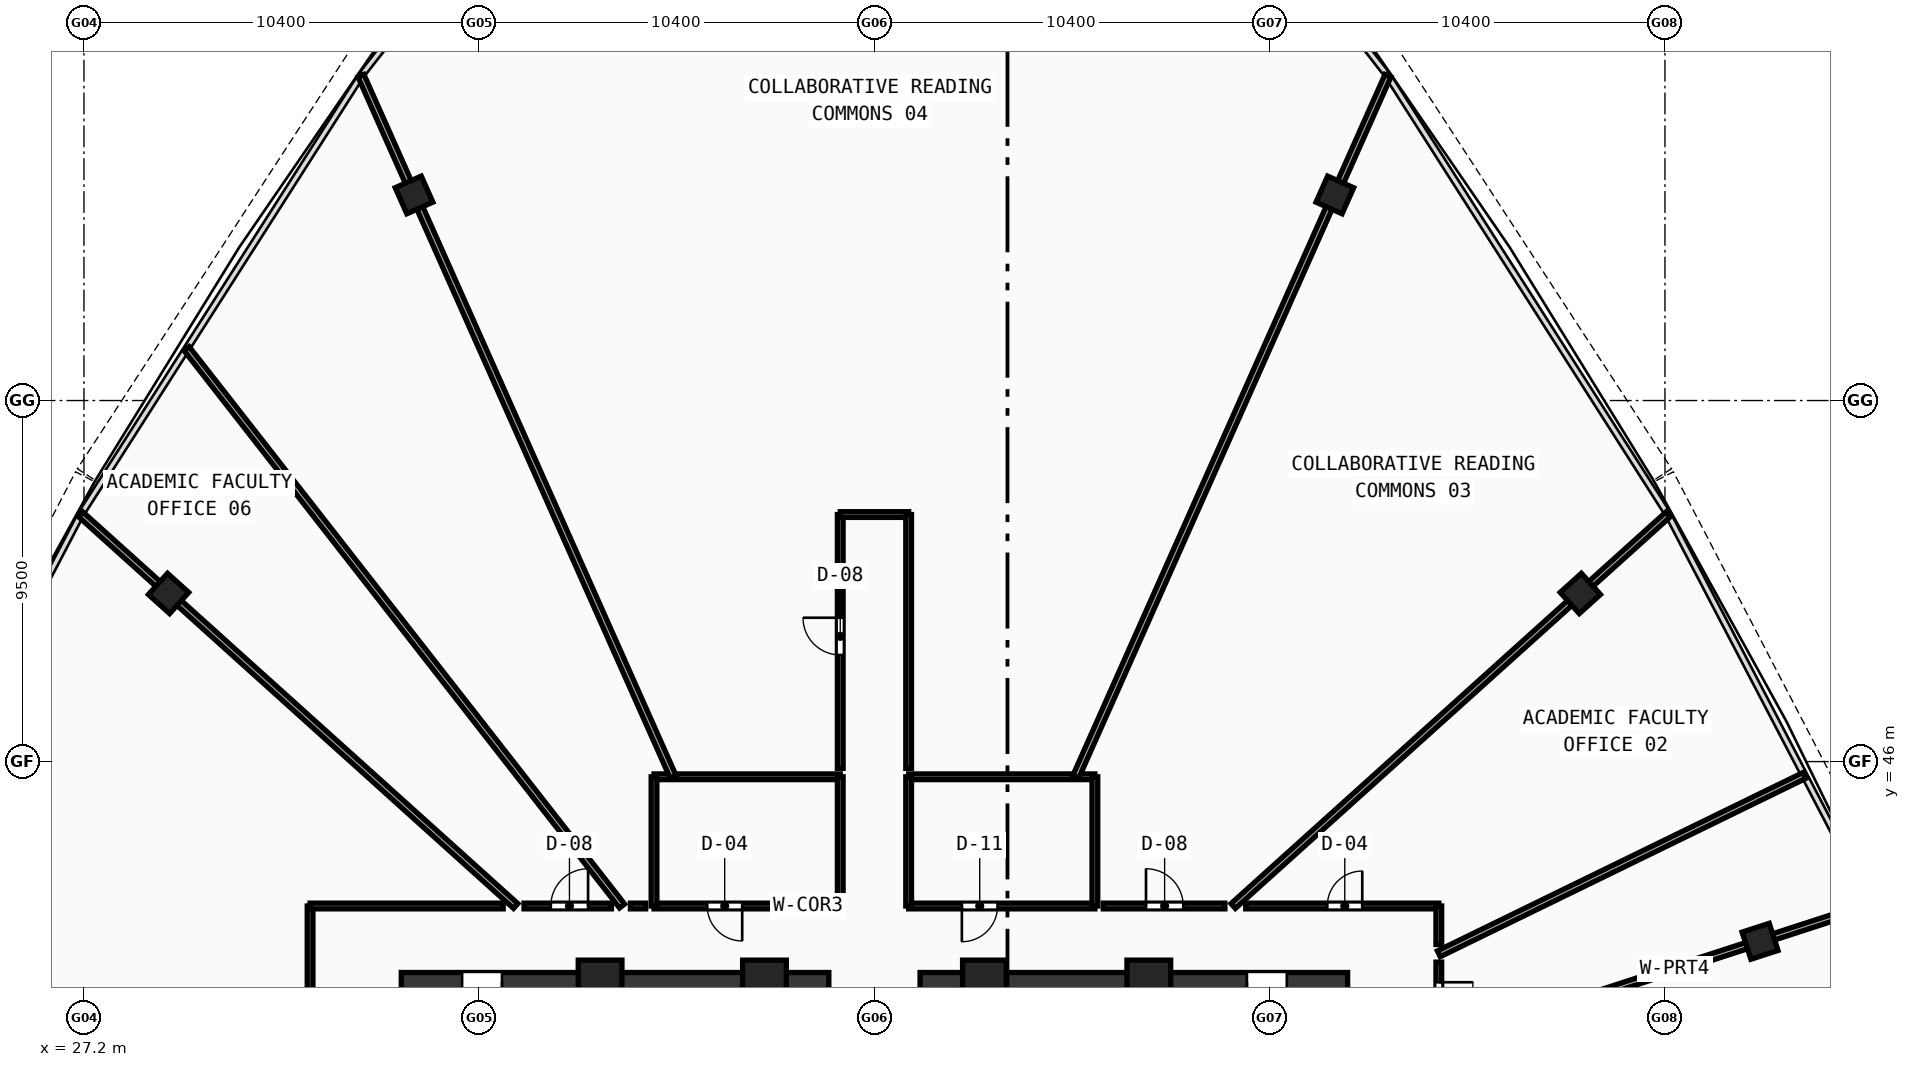
"""IFC4 building model, lengths in metres.
Left out: names, types, materials, properties, quantities, classifications, styles, units other than length and angle.
Written with IfcOpenShell. Run it as: python <this file> out.ifc"""

import sys

from ifc_helpers import new_model, si_unit, direction, frame, frame_2d, origin, origin_with_axes, origin_2d, place, context, subcontext, project, spatial, rectangle, hollow_rectangle, extrude, source, transform, mapped, element, fill, save


model = new_model("IFC4")
c1 = context("Model", 3, precision=1e-05, world=origin(), true_north=direction((0.0, 1.0)))
c2 = subcontext(c1, "Body", "Model", "MODEL_VIEW")
j1 = project(units=[si_unit("LENGTHUNIT", "METRE"), si_unit("PLANEANGLEUNIT", "RADIAN")], contexts=[c1])
p1 = place(None, origin())
s1 = spatial("IfcSite", under=j1, at=p1, CompositionType="ELEMENT")
p2 = place(p1, origin())
s2 = spatial("IfcBuilding", under=s1, at=p2, CompositionType="ELEMENT")
p3 = place(p2, frame((0.0, 0.0, 285.02)))
s3 = spatial("IfcBuildingStorey", under=s2, at=p3, CompositionType="ELEMENT", Elevation=285.02)
p4 = place(p3, frame((35.55, 40.2, 0.0), z_axis=(0.0, 0.0, 1.0), x_axis=(1.0, 0.0, 0.0)))
e1 = element("IfcWall", 1, at=p4, inside=s3, PredefinedType="SHEAR", context=c2, shape_type="SweptSolid", body=[
    extrude(rectangle(XDim=11.25, YDim=0.5, at=frame_2d((5.625, 0.0))), origin(), (0.0, 0.0, 1.0), 3.47),
])
p5 = place(p4, frame((1.6, 0.0, 0.0)))
e2 = element("IfcOpeningElement", 2, at=p5, cuts=e1, PredefinedType="OPENING", context=c2, shape_type="SweptSolid", body=[
    extrude(rectangle(XDim=1.05, YDim=2.1, at=frame_2d((0.525, 1.05))), frame((0.0, 0.26, 0.0), z_axis=(0.0, -1.0, 0.0), x_axis=(1.0, 0.0, 0.0)), (0.0, 0.0, 1.0), 0.52),
])
p6 = place(p3, frame((49.2, 40.2, 0.0), z_axis=(0.0, 0.0, 1.0), x_axis=(1.0, 0.0, 0.0)))
e3 = element("IfcWall", 3, at=p6, inside=s3, PredefinedType="SHEAR", context=c2, shape_type="SweptSolid", body=[
    extrude(rectangle(XDim=11.25, YDim=0.5, at=frame_2d((5.625, 0.0))), origin(), (0.0, 0.0, 1.0), 3.47),
])
p7 = place(p6, frame((8.6, 0.0, 0.0)))
e4 = element("IfcOpeningElement", 4, at=p7, cuts=e3, PredefinedType="OPENING", context=c2, shape_type="SweptSolid", body=[
    extrude(rectangle(XDim=1.05, YDim=2.1, at=frame_2d((0.525, 1.05))), frame((0.0, 0.26, 0.0), z_axis=(0.0, -1.0, 0.0), x_axis=(1.0, 0.0, 0.0)), (0.0, 0.0, 1.0), 0.52),
])
m1 = source(origin(), c2, "Body", "SweptSolid", [
    extrude(hollow_rectangle(XDim=1.15, YDim=1.15, WallThickness=0.048, at=origin_2d()), origin(), (0.0, 0.0, 1.0), 3.73),
])
for number, where, z_axis, x_axis in (
    (5, (55.219, 40.2, -0.26), (0.0, 0.0, 1.0), (1.0, 0.0, 0.0)),
    (6, (50.894, 40.2, -0.26), (0.0, 0.0, 1.0), (1.0, 0.0, 0.0)),
    (7, (45.106, 40.2, -0.26), (0.0, 0.0, 1.0), (1.0, 0.0, 0.0)),
    (8, (40.781, 40.2, -0.26), (0.0, 0.0, 1.0), (1.0, 0.0, 0.0)),
):
    element("IfcColumn", number, at=place(p3, frame(where, z_axis=z_axis, x_axis=x_axis)), inside=s3, PredefinedType="COLUMN", context=c2, shape_type="MappedRepresentation", body=[
        mapped(m1, transform((0.0, 0.0, 0.0), scale=1.0)),
    ])
m2 = source(origin(), c2, "Body", "SweptSolid", [
    extrude(hollow_rectangle(XDim=0.75, YDim=0.75, WallThickness=0.028, at=origin_2d()), origin(), (0.0, 0.0, 1.0), 3.73),
])
for number, where, z_axis, x_axis in (
    (9, (71.302, 41.271, -0.26), (0.0, 0.0, 1.0), (-0.309, 0.951, 0.0)),
    (10, (66.573, 50.424, -0.26), (0.0, 0.0, 1.0), (-0.669, 0.743, 0.0)),
    (11, (60.114, 60.909, -0.26), (0.0, 0.0, 1.0), (-0.914, 0.407, 0.0)),
    (12, (35.886, 60.909, -0.26), (0.0, 0.0, 1.0), (-0.914, -0.407, 0.0)),
    (13, (29.427, 50.424, -0.26), (0.0, 0.0, 1.0), (-0.669, -0.743, 0.0)),
):
    element("IfcColumn", number, at=place(p3, frame(where, z_axis=z_axis, x_axis=x_axis)), inside=s3, PredefinedType="COLUMN", context=c2, shape_type="MappedRepresentation", body=[
        mapped(m2, transform((0.0, 0.0, 0.0), scale=1.0)),
    ])
p8 = place(p3, frame((42.2, 42.2, 0.0), z_axis=(0.0, 0.0, 1.0), x_axis=(1.0, 0.0, 0.0)))
e14 = element("IfcWall", 14, at=p8, inside=s3, PredefinedType="PARTITIONING", context=c2, shape_type="SweptSolid", body=[
    extrude(rectangle(XDim=4.9, YDim=0.15, at=frame_2d((2.45, 0.0))), origin(), (0.0, 0.0, 1.0), 2.87),
])
p9 = place(p8, frame((1.4, 0.0, 0.0)))
e15 = element("IfcOpeningElement", 15, at=p9, cuts=e14, PredefinedType="OPENING", context=c2, shape_type="SweptSolid", body=[
    extrude(rectangle(XDim=0.92, YDim=2.1, at=frame_2d((0.46, 1.05))), frame((0.0, 0.085, 0.0), z_axis=(0.0, -1.0, 0.0), x_axis=(1.0, 0.0, 0.0)), (0.0, 0.0, 1.0), 0.17),
])
p10 = place(p3, frame((42.2, 45.6, 0.0), z_axis=(0.0, 0.0, 1.0), x_axis=(1.0, 0.0, 0.0)))
e16 = element("IfcWall", 16, at=p10, inside=s3, PredefinedType="PARTITIONING", context=c2, shape_type="SweptSolid", body=[
    extrude(rectangle(XDim=4.9, YDim=0.15, at=frame_2d((2.45, 0.0))), origin(), (0.0, 0.0, 1.0), 2.87),
])
for number, where, z_axis, x_axis in (
    (17, (42.2, 42.2, 0.0), (0.0, 0.0, 1.0), (0.0, 1.0, 0.0)),
    (18, (47.1, 42.2, 0.0), (0.0, 0.0, 1.0), (0.0, 1.0, 0.0)),
):
    element("IfcWall", number, at=place(p3, frame(where, z_axis=z_axis, x_axis=x_axis)), inside=s3, PredefinedType="PARTITIONING", context=c2, shape_type="SweptSolid", body=[
        extrude(rectangle(XDim=3.4, YDim=0.15, at=frame_2d((1.7, 0.0))), origin(), (0.0, 0.0, 1.0), 3.47),
    ])
p11 = place(p3, frame((48.9, 42.2, 0.0), z_axis=(0.0, 0.0, 1.0), x_axis=(1.0, 0.0, 0.0)))
e19 = element("IfcWall", 19, at=p11, inside=s3, PredefinedType="PARTITIONING", context=c2, shape_type="SweptSolid", body=[
    extrude(rectangle(XDim=4.9, YDim=0.15, at=frame_2d((2.45, 0.0))), origin(), (0.0, 0.0, 1.0), 2.87),
])
p12 = place(p11, frame((1.4, 0.0, 0.0)))
e20 = element("IfcOpeningElement", 20, at=p12, cuts=e19, PredefinedType="OPENING", context=c2, shape_type="SweptSolid", body=[
    extrude(rectangle(XDim=0.94, YDim=2.1, at=frame_2d((0.47, 1.05))), frame((0.0, 0.085, 0.0), z_axis=(0.0, -1.0, 0.0), x_axis=(1.0, 0.0, 0.0)), (0.0, 0.0, 1.0), 0.17),
])
p13 = place(p3, frame((48.9, 45.6, 0.0), z_axis=(0.0, 0.0, 1.0), x_axis=(1.0, 0.0, 0.0)))
e21 = element("IfcWall", 21, at=p13, inside=s3, PredefinedType="PARTITIONING", context=c2, shape_type="SweptSolid", body=[
    extrude(rectangle(XDim=4.9, YDim=0.15, at=frame_2d((2.45, 0.0))), origin(), (0.0, 0.0, 1.0), 2.87),
])
for number, where, z_axis, x_axis in (
    (22, (48.9, 42.2, 0.0), (0.0, 0.0, 1.0), (0.0, 1.0, 0.0)),
    (23, (53.8, 42.2, 0.0), (0.0, 0.0, 1.0), (0.0, 1.0, 0.0)),
):
    element("IfcWall", number, at=place(p3, frame(where, z_axis=z_axis, x_axis=x_axis)), inside=s3, PredefinedType="PARTITIONING", context=c2, shape_type="SweptSolid", body=[
        extrude(rectangle(XDim=3.4, YDim=0.15, at=frame_2d((1.7, 0.0))), origin(), (0.0, 0.0, 1.0), 3.47),
    ])
p14 = place(p3, frame((62.85, 38.525, 0.0), z_axis=(0.0, 0.0, 1.0), x_axis=(0.951059664494, 0.309007305047, 0.0)))
e24 = element("IfcWall", 24, at=p14, inside=s3, PredefinedType="PARTITIONING", context=c2, shape_type="SweptSolid", body=[
    extrude(rectangle(XDim=11.985, YDim=0.17, at=frame_2d((5.992, 0.0))), origin(), (0.0, 0.0, 1.0), 2.87),
])
p15 = place(p3, frame((62.85, 40.943, 0.0), z_axis=(0.0, 0.0, 1.0), x_axis=(0.89879540995, 0.43836835088, 0.0)))
e25 = element("IfcWall", 25, at=p15, inside=s3, PredefinedType="PARTITIONING", context=c2, shape_type="SweptSolid", body=[
    extrude(rectangle(XDim=10.703, YDim=0.17, at=frame_2d((5.351, 0.0))), origin(), (0.0, 0.0, 1.0), 2.87),
])
p16 = place(p3, frame((57.44, 42.2, 0.0), z_axis=(0.0, 0.0, 1.0), x_axis=(0.743145118403, 0.669130281032, 0.0)))
e26 = element("IfcWall", 26, at=p16, inside=s3, PredefinedType="PARTITIONING", context=c2, shape_type="SweptSolid", body=[
    extrude(rectangle(XDim=15.397, YDim=0.17, at=frame_2d((7.699, 0.0))), origin(), (0.0, 0.0, 1.0), 2.87),
])
for number, where, z_axis, x_axis in (
    (27, (53.298, 45.6, 0.0), (0.0, 0.0, 1.0), (0.407, 0.914, 0.0)),
    (28, (42.702, 45.6, 0.0), (0.0, 0.0, 1.0), (-0.407, 0.914, 0.0)),
):
    element("IfcWall", number, at=place(p3, frame(where, z_axis=z_axis, x_axis=x_axis)), inside=s3, PredefinedType="PARTITIONING", context=c2, shape_type="SweptSolid", body=[
        extrude(rectangle(XDim=20.191, YDim=0.17, at=frame_2d((10.096, 0.0))), origin(), (0.0, 0.0, 1.0), 2.87),
    ])
p17 = place(p3, frame((41.359, 42.2, 0.0), z_axis=(0.0, 0.0, 1.0), x_axis=(-0.615658553978, 0.788013036005, 0.0)))
e29 = element("IfcWall", 29, at=p17, inside=s3, PredefinedType="PARTITIONING", context=c2, shape_type="SweptSolid", body=[
    extrude(rectangle(XDim=18.609, YDim=0.17, at=frame_2d((9.304, 0.0))), origin(), (0.0, 0.0, 1.0), 2.87),
])
p18 = place(p3, frame((38.56, 42.2, 0.0), z_axis=(0.0, 0.0, 1.0), x_axis=(-0.743145118403, 0.669130281032, 0.0)))
e30 = element("IfcWall", 30, at=p18, inside=s3, PredefinedType="PARTITIONING", context=c2, shape_type="SweptSolid", body=[
    extrude(rectangle(XDim=15.397, YDim=0.17, at=frame_2d((7.699, 0.0))), origin(), (0.0, 0.0, 1.0), 2.87),
])
p19 = place(p3, frame((33.15, 31.301, 0.0), z_axis=(0.0, 0.0, 1.0), x_axis=(0.0, 1.0, 0.0)))
e31 = element("IfcWall", 31, at=p19, inside=s3, PredefinedType="PARTITIONING", context=c2, shape_type="SweptSolid", body=[
    extrude(rectangle(XDim=10.899, YDim=0.15, at=frame_2d((5.449, 0.0))), origin(), (0.0, 0.0, 1.0), 2.87),
])
p20 = place(p19, frame((5.094, 0.0, 0.0)))
e32 = element("IfcOpeningElement", 32, at=p20, cuts=e31, PredefinedType="OPENING", context=c2, shape_type="SweptSolid", body=[
    extrude(rectangle(XDim=0.98, YDim=2.12, at=frame_2d((0.49, 1.06))), frame((0.0, 0.085, 0.0), z_axis=(0.0, -1.0, 0.0), x_axis=(1.0, 0.0, 0.0)), (0.0, 0.0, 1.0), 0.17),
])
p21 = place(p3, frame((33.15, 42.2, 0.0), z_axis=(0.0, 0.0, 1.0), x_axis=(1.0, 0.0, 0.0)))
e33 = element("IfcWall", 33, at=p21, inside=s3, PredefinedType="PARTITIONING", context=c2, shape_type="SweptSolid", body=[
    extrude(rectangle(XDim=5.081, YDim=0.15, at=frame_2d((2.541, 0.0))), origin(), (0.0, 0.0, 1.0), 3.12),
])
p22 = place(p3, frame((38.78, 42.2, 0.0), z_axis=(0.0, 0.0, 1.0), x_axis=(1.0, 0.0, 0.0)))
e34 = element("IfcWall", 34, at=p22, inside=s3, PredefinedType="PARTITIONING", context=c2, shape_type="SweptSolid", body=[
    extrude(rectangle(XDim=2.3, YDim=0.15, at=frame_2d((1.15, 0.0))), origin(), (0.0, 0.0, 1.0), 2.87),
])
p23 = place(p22, frame((0.705, 0.0, 0.0)))
e35 = element("IfcOpeningElement", 35, at=p23, cuts=e34, PredefinedType="OPENING", context=c2, shape_type="SweptSolid", body=[
    extrude(rectangle(XDim=0.98, YDim=2.12, at=frame_2d((0.49, 1.06))), frame((0.0, 0.085, 0.0), z_axis=(0.0, -1.0, 0.0), x_axis=(1.0, 0.0, 0.0)), (0.0, 0.0, 1.0), 0.17),
])
p24 = place(p3, frame((41.579, 42.2, 0.0), z_axis=(0.0, 0.0, 1.0), x_axis=(1.0, 0.0, 0.0)))
e36 = element("IfcWall", 36, at=p24, inside=s3, PredefinedType="PARTITIONING", context=c2, shape_type="SweptSolid", body=[
    extrude(rectangle(XDim=0.401, YDim=0.15, at=frame_2d((0.201, 0.0))), origin(), (0.0, 0.0, 1.0), 3.47),
])
p25 = place(p3, frame((47.1, 45.82, 0.0), z_axis=(0.0, 0.0, 1.0), x_axis=(0.0, 1.0, 0.0)))
e37 = element("IfcWall", 37, at=p25, inside=s3, PredefinedType="PARTITIONING", context=c2, shape_type="SweptSolid", body=[
    extrude(rectangle(XDim=6.68, YDim=0.15, at=frame_2d((3.34, 0.0))), origin(), (0.0, 0.0, 1.0), 3.12),
])
p26 = place(p25, frame((2.985, 0.0, 0.0)))
e38 = element("IfcOpeningElement", 38, at=p26, cuts=e37, PredefinedType="OPENING", context=c2, shape_type="SweptSolid", body=[
    extrude(rectangle(XDim=0.98, YDim=2.12, at=frame_2d((0.49, 1.06))), frame((0.0, 0.085, 0.0), z_axis=(0.0, -1.0, 0.0), x_axis=(1.0, 0.0, 0.0)), (0.0, 0.0, 1.0), 0.17),
])
p27 = place(p3, frame((47.1, 52.5, 0.0), z_axis=(0.0, 0.0, 1.0), x_axis=(1.0, 0.0, 0.0)))
e39 = element("IfcWall", 39, at=p27, inside=s3, PredefinedType="PARTITIONING", context=c2, shape_type="SweptSolid", body=[
    extrude(rectangle(XDim=1.8, YDim=0.15, at=frame_2d((0.9, 0.0))), origin(), (0.0, 0.0, 1.0), 3.47),
])
p28 = place(p3, frame((48.9, 52.5, 0.0), z_axis=(0.0, 0.0, 1.0), x_axis=(0.0, -1.0, 0.0)))
e40 = element("IfcWall", 40, at=p28, inside=s3, PredefinedType="PARTITIONING", context=c2, shape_type="SweptSolid", body=[
    extrude(rectangle(XDim=6.68, YDim=0.15, at=frame_2d((3.34, 0.0))), origin(), (0.0, 0.0, 1.0), 3.12),
])
p29 = place(p3, frame((54.02, 42.2, 0.0), z_axis=(0.0, 0.0, 1.0), x_axis=(1.0, 0.0, 0.0)))
e41 = element("IfcWall", 41, at=p29, inside=s3, PredefinedType="PARTITIONING", context=c2, shape_type="SweptSolid", body=[
    extrude(rectangle(XDim=3.2, YDim=0.15, at=frame_2d((1.6, 0.0))), origin(), (0.0, 0.0, 1.0), 2.87),
])
p30 = place(p29, frame((1.125, 0.0, 0.0)))
e42 = element("IfcOpeningElement", 42, at=p30, cuts=e41, PredefinedType="OPENING", context=c2, shape_type="SweptSolid", body=[
    extrude(rectangle(XDim=0.98, YDim=2.12, at=frame_2d((0.49, 1.06))), frame((0.0, 0.085, 0.0), z_axis=(0.0, -1.0, 0.0), x_axis=(1.0, 0.0, 0.0)), (0.0, 0.0, 1.0), 0.17),
])
p31 = place(p3, frame((57.769, 42.2, 0.0), z_axis=(0.0, 0.0, 1.0), x_axis=(1.0, 0.0, 0.0)))
e43 = element("IfcWall", 43, at=p31, inside=s3, PredefinedType="PARTITIONING", context=c2, shape_type="SweptSolid", body=[
    extrude(rectangle(XDim=5.081, YDim=0.15, at=frame_2d((2.541, 0.0))), origin(), (0.0, 0.0, 1.0), 3.12),
])
p32 = place(p31, frame((2.146, 0.0, 0.0)))
e44 = element("IfcOpeningElement", 44, at=p32, cuts=e43, PredefinedType="OPENING", context=c2, shape_type="SweptSolid", body=[
    extrude(rectangle(XDim=0.92, YDim=2.1, at=frame_2d((0.46, 1.05))), frame((0.0, 0.085, 0.0), z_axis=(0.0, -1.0, 0.0), x_axis=(1.0, 0.0, 0.0)), (0.0, 0.0, 1.0), 0.17),
])
p33 = place(p3, frame((62.85, 42.2, 0.0), z_axis=(0.0, 0.0, 1.0), x_axis=(0.0, -1.0, 0.0)))
e45 = element("IfcWall", 45, at=p33, inside=s3, PredefinedType="PARTITIONING", context=c2, shape_type="SweptSolid", body=[
    extrude(rectangle(XDim=1.012, YDim=0.15, at=frame_2d((0.506, 0.0))), origin(), (0.0, 0.0, 1.0), 3.47),
])
p34 = place(p3, frame((62.85, 40.723, 0.0), z_axis=(0.0, 0.0, 1.0), x_axis=(0.0, -1.0, 0.0)))
e46 = element("IfcWall", 46, at=p34, inside=s3, PredefinedType="PARTITIONING", context=c2, shape_type="SweptSolid", body=[
    extrude(rectangle(XDim=1.967, YDim=0.15, at=frame_2d((0.983, 0.0))), origin(), (0.0, 0.0, 1.0), 3.12),
])
p35 = place(p34, frame((0.529, 0.0, 0.0)))
e47 = element("IfcOpeningElement", 47, at=p35, cuts=e46, PredefinedType="OPENING", context=c2, shape_type="SweptSolid", body=[
    extrude(rectangle(XDim=0.9, YDim=2.08, at=frame_2d((0.45, 1.04))), frame((0.0, 0.085, 0.0), z_axis=(0.0, -1.0, 0.0), x_axis=(1.0, 0.0, 0.0)), (0.0, 0.0, 1.0), 0.17),
])
m3 = source(origin(), c2, "Body", "SweptSolid", [
    extrude(rectangle(XDim=1.05, YDim=2.1, at=frame_2d((0.525, 1.05))), frame((0.0, 0.025, 0.0), z_axis=(0.0, -1.0, 0.0), x_axis=(1.0, 0.0, 0.0)), (0.0, 0.0, 1.0), 0.05),
])
p36 = place(p5, frame((1.05, 0.0, 0.0), z_axis=(0.0, 0.0, 1.0), x_axis=(-1.0, 0.0, 0.0)))
e48 = element("IfcDoor", 48, at=p36, inside=s3, OperationType="SINGLE_SWING_LEFT", PredefinedType="DOOR", context=c2, shape_type="MappedRepresentation", body=[
    mapped(m3, transform((0.0, 0.0, 0.0), scale=1.0)),
])
fill(e2, e48)
p37 = place(p7, frame((1.05, 0.0, 0.0), z_axis=(0.0, 0.0, 1.0), x_axis=(-1.0, 0.0, 0.0)))
e49 = element("IfcDoor", 49, at=p37, inside=s3, OperationType="SINGLE_SWING_RIGHT", PredefinedType="DOOR", context=c2, shape_type="MappedRepresentation", body=[
    mapped(m3, transform((0.0, 0.0, 0.0), scale=1.0)),
])
fill(e4, e49)
m4 = source(origin(), c2, "Body", "SweptSolid", [
    extrude(rectangle(XDim=0.92, YDim=2.1, at=frame_2d((0.46, 1.05))), frame((0.0, 0.025, 0.0), z_axis=(0.0, -1.0, 0.0), x_axis=(1.0, 0.0, 0.0)), (0.0, 0.0, 1.0), 0.05),
])
p38 = place(p9, frame((0.92, 0.0, 0.0), z_axis=(0.0, 0.0, 1.0), x_axis=(-1.0, 0.0, 0.0)))
e50 = element("IfcDoor", 50, at=p38, inside=s3, OperationType="SINGLE_SWING_LEFT", PredefinedType="DOOR", context=c2, shape_type="MappedRepresentation", body=[
    mapped(m4, transform((0.0, 0.0, 0.0), scale=1.0)),
])
fill(e15, e50)
m5 = source(origin(), c2, "Body", "SweptSolid", [
    extrude(rectangle(XDim=0.94, YDim=2.1, at=frame_2d((0.47, 1.05))), frame((0.0, 0.025, 0.0), z_axis=(0.0, -1.0, 0.0), x_axis=(1.0, 0.0, 0.0)), (0.0, 0.0, 1.0), 0.05),
])
p39 = place(p12, frame((0.94, 0.0, 0.0), z_axis=(0.0, 0.0, 1.0), x_axis=(-1.0, 0.0, 0.0)))
e51 = element("IfcDoor", 51, at=p39, inside=s3, OperationType="SINGLE_SWING_RIGHT", PredefinedType="DOOR", context=c2, shape_type="MappedRepresentation", body=[
    mapped(m5, transform((0.0, 0.0, 0.0), scale=1.0)),
])
fill(e20, e51)
m6 = source(origin(), c2, "Body", "SweptSolid", [
    extrude(rectangle(XDim=0.9, YDim=2.08, at=frame_2d((0.45, 1.04))), frame((0.0, 0.025, 0.0), z_axis=(0.0, -1.0, 0.0), x_axis=(1.0, 0.0, 0.0)), (0.0, 0.0, 1.0), 0.05),
])
p40 = place(p35, origin_with_axes())
e52 = element("IfcDoor", 52, at=p40, inside=s3, OperationType="SINGLE_SWING_LEFT", PredefinedType="DOOR", context=c2, shape_type="MappedRepresentation", body=[
    mapped(m6, transform((0.0, 0.0, 0.0), scale=1.0)),
])
fill(e47, e52)
p41 = place(p32, origin_with_axes())
e53 = element("IfcDoor", 53, at=p41, inside=s3, OperationType="SINGLE_SWING_RIGHT", PredefinedType="DOOR", context=c2, shape_type="MappedRepresentation", body=[
    mapped(m4, transform((0.0, 0.0, 0.0), scale=1.0)),
])
fill(e44, e53)
m7 = source(origin(), c2, "Body", "SweptSolid", [
    extrude(rectangle(XDim=0.98, YDim=2.12, at=frame_2d((0.49, 1.06))), frame((0.0, 0.025, 0.0), z_axis=(0.0, -1.0, 0.0), x_axis=(1.0, 0.0, 0.0)), (0.0, 0.0, 1.0), 0.05),
])
p42 = place(p30, origin_with_axes())
e54 = element("IfcDoor", 54, at=p42, inside=s3, OperationType="SINGLE_SWING_LEFT", PredefinedType="DOOR", context=c2, shape_type="MappedRepresentation", body=[
    mapped(m7, transform((0.0, 0.0, 0.0), scale=1.0)),
])
fill(e42, e54)
p43 = place(p26, origin_with_axes())
e55 = element("IfcDoor", 55, at=p43, inside=s3, OperationType="SINGLE_SWING_RIGHT", PredefinedType="DOOR", context=c2, shape_type="MappedRepresentation", body=[
    mapped(m7, transform((0.0, 0.0, 0.0), scale=1.0)),
])
fill(e38, e55)
p44 = place(p23, origin_with_axes())
e56 = element("IfcDoor", 56, at=p44, inside=s3, OperationType="SINGLE_SWING_RIGHT", PredefinedType="DOOR", context=c2, shape_type="MappedRepresentation", body=[
    mapped(m7, transform((0.0, 0.0, 0.0), scale=1.0)),
])
fill(e35, e56)
save(model, sys.argv[1])
